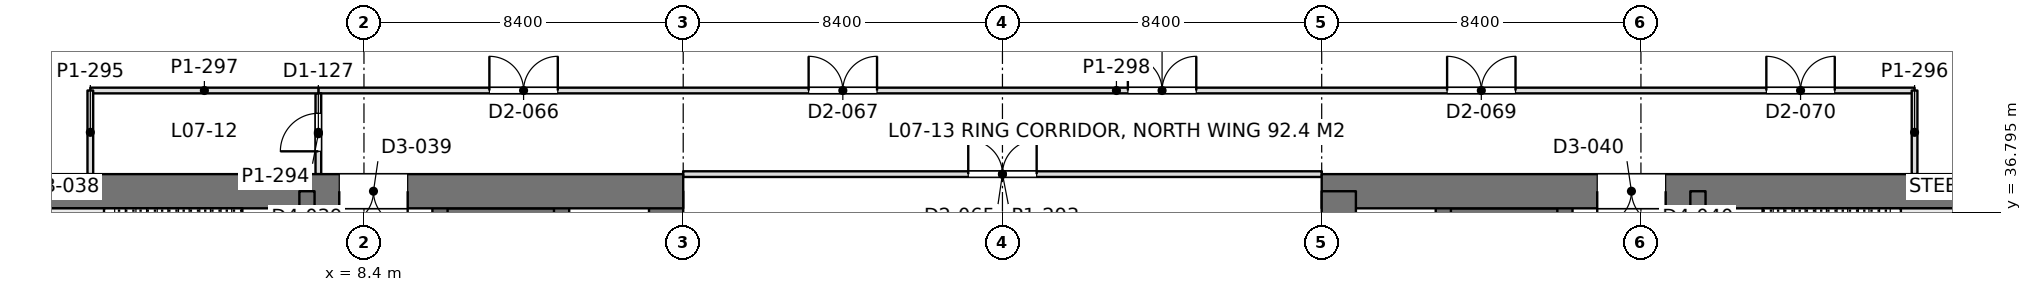
"""IFC4 building model, lengths in metres.
Left out: names, types, materials, properties, quantities, classifications, styles, units other than length and angle.
Written with IfcOpenShell. Run it as: python <this file> out.ifc"""

import sys

from ifc_helpers import new_model, si_unit, direction, frame, frame_2d, origin, place, context, subcontext, project, spatial, rectangle, extrude, element, fill, save


model = new_model("IFC4")
c1 = context("Model", 3, precision=1e-05, world=origin(), true_north=direction((0.0, 1.0)))
c2 = subcontext(c1, "Body", "Model", "MODEL_VIEW")
j1 = project(units=[si_unit("LENGTHUNIT", "METRE"), si_unit("PLANEANGLEUNIT", "RADIAN")], contexts=[c1])
p1 = place(None, origin())
s1 = spatial("IfcSite", under=j1, at=p1, CompositionType="ELEMENT")
p2 = place(p1, origin())
s2 = spatial("IfcBuilding", under=s1, at=p2, CompositionType="ELEMENT")
p3 = place(p2, frame((0.0, 0.0, 32.4)))
s3 = spatial("IfcBuildingStorey", under=s2, at=p3, CompositionType="ELEMENT", Elevation=32.4)
p4 = place(p3, frame((-1.2, 37.35, 0.0), z_axis=(0.0, 0.0, 1.0), x_axis=(1.0, 0.0, 0.0)))
e1 = element("IfcWall", 1, at=p4, inside=s3, PredefinedType="SHEAR", context=c2, shape_type="SweptSolid", body=[
    extrude(rectangle(XDim=18.0, YDim=0.9, at=frame_2d((9.0, 0.0))), origin(), (0.0, 0.0, 1.0), 4.5),
])
p5 = place(p4, frame((8.95, 0.0, 0.0)))
e2 = element("IfcOpeningElement", 2, at=p5, cuts=e1, PredefinedType="OPENING", context=c2, shape_type="SweptSolid", body=[
    extrude(rectangle(XDim=1.8, YDim=2.4, at=frame_2d((0.9, 1.2))), frame((0.0, 0.46, 0.0), z_axis=(0.0, -1.0, 0.0), x_axis=(1.0, 0.0, 0.0)), (0.0, 0.0, 1.0), 0.92),
])
p6 = place(p3, frame((16.35, 13.05, 0.0), z_axis=(0.0, 0.0, 1.0), x_axis=(0.0, 1.0, 0.0)))
e3 = element("IfcWall", 3, at=p6, inside=s3, PredefinedType="SHEAR", context=c2, shape_type="SweptSolid", body=[
    extrude(rectangle(XDim=24.3, YDim=0.9, at=frame_2d((12.15, 0.0))), origin(), (0.0, 0.0, 1.0), 4.5),
])
p7 = place(p3, frame((6.9, 13.05, 0.0), z_axis=(0.0, 0.0, 1.0), x_axis=(0.0, 1.0, 0.0)))
e4 = element("IfcWall", 4, at=p7, inside=s3, PredefinedType="SHEAR", context=c2, shape_type="SweptSolid", body=[
    extrude(rectangle(XDim=24.3, YDim=0.4, at=frame_2d((12.15, 0.0))), origin(), (0.0, 0.0, 1.0), 4.5),
])
p8 = place(p7, frame((1.3, 0.0, 0.0)))
e5 = element("IfcOpeningElement", 5, at=p8, cuts=e4, PredefinedType="OPENING", context=c2, shape_type="SweptSolid", body=[
    extrude(rectangle(XDim=1.0, YDim=2.2, at=frame_2d((0.5, 1.1))), frame((0.0, 0.21, 0.0), z_axis=(0.0, -1.0, 0.0), x_axis=(1.0, 0.0, 0.0)), (0.0, 0.0, 1.0), 0.42),
])
p9 = place(p7, frame((22.0, 0.0, 0.0)))
e6 = element("IfcOpeningElement", 6, at=p9, cuts=e4, PredefinedType="OPENING", context=c2, shape_type="SweptSolid", body=[
    extrude(rectangle(XDim=1.0, YDim=2.2, at=frame_2d((0.5, 1.1))), frame((0.0, 0.21, 0.0), z_axis=(0.0, -1.0, 0.0), x_axis=(1.0, 0.0, 0.0)), (0.0, 0.0, 1.0), 0.42),
])
p10 = place(p7, frame((5.55, 0.0, 0.0)))
e7 = element("IfcOpeningElement", 7, at=p10, cuts=e4, PredefinedType="OPENING", context=c2, shape_type="SweptSolid", body=[
    extrude(rectangle(XDim=1.0, YDim=2.2, at=frame_2d((0.5, 1.1))), frame((0.0, 0.21, 0.0), z_axis=(0.0, -1.0, 0.0), x_axis=(1.0, 0.0, 0.0)), (0.0, 0.0, 1.0), 0.42),
])
p11 = place(p7, frame((9.55, 0.0, 0.0)))
e8 = element("IfcOpeningElement", 8, at=p11, cuts=e4, PredefinedType="OPENING", context=c2, shape_type="SweptSolid", body=[
    extrude(rectangle(XDim=1.0, YDim=2.2, at=frame_2d((0.5, 1.1))), frame((0.0, 0.21, 0.0), z_axis=(0.0, -1.0, 0.0), x_axis=(1.0, 0.0, 0.0)), (0.0, 0.0, 1.0), 0.42),
])
p12 = place(p7, frame((12.8, 0.0, 0.0)))
e9 = element("IfcOpeningElement", 9, at=p12, cuts=e4, PredefinedType="OPENING", context=c2, shape_type="SweptSolid", body=[
    extrude(rectangle(XDim=1.1, YDim=2.2, at=frame_2d((0.55, 1.1))), frame((0.0, 0.21, 0.0), z_axis=(0.0, -1.0, 0.0), x_axis=(1.0, 0.0, 0.0)), (0.0, 0.0, 1.0), 0.42),
])
p13 = place(p7, frame((15.538, 0.0, 0.0)))
e10 = element("IfcOpeningElement", 10, at=p13, cuts=e4, PredefinedType="OPENING", context=c2, shape_type="SweptSolid", body=[
    extrude(rectangle(XDim=1.1, YDim=2.2, at=frame_2d((0.55, 1.1))), frame((0.0, 0.21, 0.0), z_axis=(0.0, -1.0, 0.0), x_axis=(1.0, 0.0, 0.0)), (0.0, 0.0, 1.0), 0.42),
])
p14 = place(p7, frame((18.262, 0.0, 0.0)))
e11 = element("IfcOpeningElement", 11, at=p14, cuts=e4, PredefinedType="OPENING", context=c2, shape_type="SweptSolid", body=[
    extrude(rectangle(XDim=1.1, YDim=2.2, at=frame_2d((0.55, 1.1))), frame((0.0, 0.21, 0.0), z_axis=(0.0, -1.0, 0.0), x_axis=(1.0, 0.0, 0.0)), (0.0, 0.0, 1.0), 0.42),
])
p15 = place(p3, frame((10.4, 13.05, 0.0), z_axis=(0.0, 0.0, 1.0), x_axis=(0.0, 1.0, 0.0)))
e12 = element("IfcWall", 12, at=p15, inside=s3, PredefinedType="SHEAR", context=c2, shape_type="SweptSolid", body=[
    extrude(rectangle(XDim=24.3, YDim=0.4, at=frame_2d((12.15, 0.0))), origin(), (0.0, 0.0, 1.0), 4.5),
])
p16 = place(p15, frame((1.5, 0.0, 0.0)))
e13 = element("IfcOpeningElement", 13, at=p16, cuts=e12, PredefinedType="OPENING", context=c2, shape_type="SweptSolid", body=[
    extrude(rectangle(XDim=1.1, YDim=2.2, at=frame_2d((0.55, 1.1))), frame((0.0, 0.21, 0.0), z_axis=(0.0, -1.0, 0.0), x_axis=(1.0, 0.0, 0.0)), (0.0, 0.0, 1.0), 0.42),
])
p17 = place(p15, frame((4.35, 0.0, 0.0)))
e14 = element("IfcOpeningElement", 14, at=p17, cuts=e12, PredefinedType="OPENING", context=c2, shape_type="SweptSolid", body=[
    extrude(rectangle(XDim=1.1, YDim=2.2, at=frame_2d((0.55, 1.1))), frame((0.0, 0.21, 0.0), z_axis=(0.0, -1.0, 0.0), x_axis=(1.0, 0.0, 0.0)), (0.0, 0.0, 1.0), 0.42),
])
p18 = place(p15, frame((7.2, 0.0, 0.0)))
e15 = element("IfcOpeningElement", 15, at=p18, cuts=e12, PredefinedType="OPENING", context=c2, shape_type="SweptSolid", body=[
    extrude(rectangle(XDim=1.1, YDim=2.2, at=frame_2d((0.55, 1.1))), frame((0.0, 0.21, 0.0), z_axis=(0.0, -1.0, 0.0), x_axis=(1.0, 0.0, 0.0)), (0.0, 0.0, 1.0), 0.42),
])
p19 = place(p15, frame((21.45, 0.0, 0.0)))
e16 = element("IfcOpeningElement", 16, at=p19, cuts=e12, PredefinedType="OPENING", context=c2, shape_type="SweptSolid", body=[
    extrude(rectangle(XDim=1.1, YDim=2.2, at=frame_2d((0.55, 1.1))), frame((0.0, 0.21, 0.0), z_axis=(0.0, -1.0, 0.0), x_axis=(1.0, 0.0, 0.0)), (0.0, 0.0, 1.0), 0.42),
])
p20 = place(p3, frame((13.6, 13.05, 0.0), z_axis=(0.0, 0.0, 1.0), x_axis=(0.0, 1.0, 0.0)))
e17 = element("IfcWall", 17, at=p20, inside=s3, PredefinedType="SHEAR", context=c2, shape_type="SweptSolid", body=[
    extrude(rectangle(XDim=24.3, YDim=0.4, at=frame_2d((12.15, 0.0))), origin(), (0.0, 0.0, 1.0), 4.5),
])
p21 = place(p3, frame((10.4, 36.625, 0.0), z_axis=(0.0, 0.0, 1.0), x_axis=(1.0, 0.0, 0.0)))
e18 = element("IfcWall", 18, at=p21, inside=s3, PredefinedType="SHEAR", context=c2, shape_type="SweptSolid", body=[
    extrude(rectangle(XDim=3.2, YDim=0.55, at=frame_2d((1.6, 0.0))), origin(), (0.0, 0.0, 1.0), 4.5),
])
p22 = place(p3, frame((33.6, 37.35, 0.0), z_axis=(0.0, 0.0, 1.0), x_axis=(1.0, 0.0, 0.0)))
e19 = element("IfcWall", 19, at=p22, inside=s3, PredefinedType="SHEAR", context=c2, shape_type="SweptSolid", body=[
    extrude(rectangle(XDim=18.0, YDim=0.9, at=frame_2d((9.0, 0.0))), origin(), (0.0, 0.0, 1.0), 4.5),
])
p23 = place(p22, frame((7.25, 0.0, 0.0)))
e20 = element("IfcOpeningElement", 20, at=p23, cuts=e19, PredefinedType="OPENING", context=c2, shape_type="SweptSolid", body=[
    extrude(rectangle(XDim=1.8, YDim=2.4, at=frame_2d((0.9, 1.2))), frame((0.0, 0.46, 0.0), z_axis=(0.0, -1.0, 0.0), x_axis=(1.0, 0.0, 0.0)), (0.0, 0.0, 1.0), 0.92),
])
p24 = place(p3, frame((34.05, 13.05, 0.0), z_axis=(0.0, 0.0, 1.0), x_axis=(0.0, 1.0, 0.0)))
e21 = element("IfcWall", 21, at=p24, inside=s3, PredefinedType="SHEAR", context=c2, shape_type="SweptSolid", body=[
    extrude(rectangle(XDim=24.3, YDim=0.9, at=frame_2d((12.15, 0.0))), origin(), (0.0, 0.0, 1.0), 4.5),
])
p25 = place(p3, frame((43.5, 13.05, 0.0), z_axis=(0.0, 0.0, 1.0), x_axis=(0.0, 1.0, 0.0)))
e22 = element("IfcWall", 22, at=p25, inside=s3, PredefinedType="SHEAR", context=c2, shape_type="SweptSolid", body=[
    extrude(rectangle(XDim=24.3, YDim=0.4, at=frame_2d((12.15, 0.0))), origin(), (0.0, 0.0, 1.0), 4.5),
])
p26 = place(p25, frame((1.3, 0.0, 0.0)))
e23 = element("IfcOpeningElement", 23, at=p26, cuts=e22, PredefinedType="OPENING", context=c2, shape_type="SweptSolid", body=[
    extrude(rectangle(XDim=1.0, YDim=2.2, at=frame_2d((0.5, 1.1))), frame((0.0, 0.21, 0.0), z_axis=(0.0, -1.0, 0.0), x_axis=(1.0, 0.0, 0.0)), (0.0, 0.0, 1.0), 0.42),
])
p27 = place(p25, frame((22.0, 0.0, 0.0)))
e24 = element("IfcOpeningElement", 24, at=p27, cuts=e22, PredefinedType="OPENING", context=c2, shape_type="SweptSolid", body=[
    extrude(rectangle(XDim=1.0, YDim=2.2, at=frame_2d((0.5, 1.1))), frame((0.0, 0.21, 0.0), z_axis=(0.0, -1.0, 0.0), x_axis=(1.0, 0.0, 0.0)), (0.0, 0.0, 1.0), 0.42),
])
p28 = place(p25, frame((5.55, 0.0, 0.0)))
e25 = element("IfcOpeningElement", 25, at=p28, cuts=e22, PredefinedType="OPENING", context=c2, shape_type="SweptSolid", body=[
    extrude(rectangle(XDim=1.0, YDim=2.2, at=frame_2d((0.5, 1.1))), frame((0.0, 0.21, 0.0), z_axis=(0.0, -1.0, 0.0), x_axis=(1.0, 0.0, 0.0)), (0.0, 0.0, 1.0), 0.42),
])
p29 = place(p25, frame((9.55, 0.0, 0.0)))
e26 = element("IfcOpeningElement", 26, at=p29, cuts=e22, PredefinedType="OPENING", context=c2, shape_type="SweptSolid", body=[
    extrude(rectangle(XDim=1.0, YDim=2.2, at=frame_2d((0.5, 1.1))), frame((0.0, 0.21, 0.0), z_axis=(0.0, -1.0, 0.0), x_axis=(1.0, 0.0, 0.0)), (0.0, 0.0, 1.0), 0.42),
])
p30 = place(p25, frame((12.8, 0.0, 0.0)))
e27 = element("IfcOpeningElement", 27, at=p30, cuts=e22, PredefinedType="OPENING", context=c2, shape_type="SweptSolid", body=[
    extrude(rectangle(XDim=1.1, YDim=2.2, at=frame_2d((0.55, 1.1))), frame((0.0, 0.21, 0.0), z_axis=(0.0, -1.0, 0.0), x_axis=(1.0, 0.0, 0.0)), (0.0, 0.0, 1.0), 0.42),
])
p31 = place(p25, frame((15.538, 0.0, 0.0)))
e28 = element("IfcOpeningElement", 28, at=p31, cuts=e22, PredefinedType="OPENING", context=c2, shape_type="SweptSolid", body=[
    extrude(rectangle(XDim=1.1, YDim=2.2, at=frame_2d((0.55, 1.1))), frame((0.0, 0.21, 0.0), z_axis=(0.0, -1.0, 0.0), x_axis=(1.0, 0.0, 0.0)), (0.0, 0.0, 1.0), 0.42),
])
p32 = place(p25, frame((18.262, 0.0, 0.0)))
e29 = element("IfcOpeningElement", 29, at=p32, cuts=e22, PredefinedType="OPENING", context=c2, shape_type="SweptSolid", body=[
    extrude(rectangle(XDim=1.1, YDim=2.2, at=frame_2d((0.55, 1.1))), frame((0.0, 0.21, 0.0), z_axis=(0.0, -1.0, 0.0), x_axis=(1.0, 0.0, 0.0)), (0.0, 0.0, 1.0), 0.42),
])
p33 = place(p3, frame((40.0, 13.05, 0.0), z_axis=(0.0, 0.0, 1.0), x_axis=(0.0, 1.0, 0.0)))
e30 = element("IfcWall", 30, at=p33, inside=s3, PredefinedType="SHEAR", context=c2, shape_type="SweptSolid", body=[
    extrude(rectangle(XDim=24.3, YDim=0.4, at=frame_2d((12.15, 0.0))), origin(), (0.0, 0.0, 1.0), 4.5),
])
p34 = place(p33, frame((1.5, 0.0, 0.0)))
e31 = element("IfcOpeningElement", 31, at=p34, cuts=e30, PredefinedType="OPENING", context=c2, shape_type="SweptSolid", body=[
    extrude(rectangle(XDim=1.1, YDim=2.2, at=frame_2d((0.55, 1.1))), frame((0.0, 0.21, 0.0), z_axis=(0.0, -1.0, 0.0), x_axis=(1.0, 0.0, 0.0)), (0.0, 0.0, 1.0), 0.42),
])
p35 = place(p33, frame((4.35, 0.0, 0.0)))
e32 = element("IfcOpeningElement", 32, at=p35, cuts=e30, PredefinedType="OPENING", context=c2, shape_type="SweptSolid", body=[
    extrude(rectangle(XDim=1.1, YDim=2.2, at=frame_2d((0.55, 1.1))), frame((0.0, 0.21, 0.0), z_axis=(0.0, -1.0, 0.0), x_axis=(1.0, 0.0, 0.0)), (0.0, 0.0, 1.0), 0.42),
])
p36 = place(p33, frame((7.2, 0.0, 0.0)))
e33 = element("IfcOpeningElement", 33, at=p36, cuts=e30, PredefinedType="OPENING", context=c2, shape_type="SweptSolid", body=[
    extrude(rectangle(XDim=1.1, YDim=2.2, at=frame_2d((0.55, 1.1))), frame((0.0, 0.21, 0.0), z_axis=(0.0, -1.0, 0.0), x_axis=(1.0, 0.0, 0.0)), (0.0, 0.0, 1.0), 0.42),
])
p37 = place(p33, frame((21.45, 0.0, 0.0)))
e34 = element("IfcOpeningElement", 34, at=p37, cuts=e30, PredefinedType="OPENING", context=c2, shape_type="SweptSolid", body=[
    extrude(rectangle(XDim=1.1, YDim=2.2, at=frame_2d((0.55, 1.1))), frame((0.0, 0.21, 0.0), z_axis=(0.0, -1.0, 0.0), x_axis=(1.0, 0.0, 0.0)), (0.0, 0.0, 1.0), 0.42),
])
p38 = place(p3, frame((36.8, 13.05, 0.0), z_axis=(0.0, 0.0, 1.0), x_axis=(0.0, 1.0, 0.0)))
e35 = element("IfcWall", 35, at=p38, inside=s3, PredefinedType="SHEAR", context=c2, shape_type="SweptSolid", body=[
    extrude(rectangle(XDim=24.3, YDim=0.4, at=frame_2d((12.15, 0.0))), origin(), (0.0, 0.0, 1.0), 4.5),
])
p39 = place(p3, frame((40.0, 36.625, 0.0), z_axis=(0.0, 0.0, 1.0), x_axis=(-1.0, 0.0, 0.0)))
e36 = element("IfcWall", 36, at=p39, inside=s3, PredefinedType="SHEAR", context=c2, shape_type="SweptSolid", body=[
    extrude(rectangle(XDim=3.2, YDim=0.55, at=frame_2d((1.6, 0.0))), origin(), (0.0, 0.0, 1.0), 4.5),
])
p40 = place(p3, frame((7.198, 40.0, 0.0), z_axis=(0.0, 0.0, 1.0), x_axis=(1.0, 0.0, 0.0)))
e37 = element("IfcWall", 37, at=p40, inside=s3, PredefinedType="PARTITIONING", context=c2, shape_type="SweptSolid", body=[
    extrude(rectangle(XDim=42.002, YDim=0.15, at=frame_2d((21.001, 0.0))), origin(), (0.0, 0.0, 1.0), 3.74),
])
p41 = place(p40, frame((4.502, 0.0, 0.0)))
e38 = element("IfcOpeningElement", 38, at=p41, cuts=e37, PredefinedType="OPENING", context=c2, shape_type="SweptSolid", body=[
    extrude(rectangle(XDim=1.8, YDim=2.2, at=frame_2d((0.9, 1.1))), frame((0.0, 0.085, 0.0), z_axis=(0.0, -1.0, 0.0), x_axis=(1.0, 0.0, 0.0)), (0.0, 0.0, 1.0), 0.17),
])
p42 = place(p40, frame((12.902, 0.0, 0.0)))
e39 = element("IfcOpeningElement", 39, at=p42, cuts=e37, PredefinedType="OPENING", context=c2, shape_type="SweptSolid", body=[
    extrude(rectangle(XDim=1.8, YDim=2.2, at=frame_2d((0.9, 1.1))), frame((0.0, 0.085, 0.0), z_axis=(0.0, -1.0, 0.0), x_axis=(1.0, 0.0, 0.0)), (0.0, 0.0, 1.0), 0.17),
])
p43 = place(p40, frame((21.302, 0.0, 0.0)))
e40 = element("IfcOpeningElement", 40, at=p43, cuts=e37, PredefinedType="OPENING", context=c2, shape_type="SweptSolid", body=[
    extrude(rectangle(XDim=1.8, YDim=2.2, at=frame_2d((0.9, 1.1))), frame((0.0, 0.085, 0.0), z_axis=(0.0, -1.0, 0.0), x_axis=(1.0, 0.0, 0.0)), (0.0, 0.0, 1.0), 0.17),
])
p44 = place(p40, frame((29.702, 0.0, 0.0)))
e41 = element("IfcOpeningElement", 41, at=p44, cuts=e37, PredefinedType="OPENING", context=c2, shape_type="SweptSolid", body=[
    extrude(rectangle(XDim=1.8, YDim=2.2, at=frame_2d((0.9, 1.1))), frame((0.0, 0.085, 0.0), z_axis=(0.0, -1.0, 0.0), x_axis=(1.0, 0.0, 0.0)), (0.0, 0.0, 1.0), 0.17),
])
p45 = place(p40, frame((38.102, 0.0, 0.0)))
e42 = element("IfcOpeningElement", 42, at=p45, cuts=e37, PredefinedType="OPENING", context=c2, shape_type="SweptSolid", body=[
    extrude(rectangle(XDim=1.8, YDim=2.2, at=frame_2d((0.9, 1.1))), frame((0.0, 0.085, 0.0), z_axis=(0.0, -1.0, 0.0), x_axis=(1.0, 0.0, 0.0)), (0.0, 0.0, 1.0), 0.17),
])
p46 = place(p3, frame((7.2, 37.8, 0.0), z_axis=(0.0, 0.0, 1.0), x_axis=(0.0, 1.0, 0.0)))
e43 = element("IfcWall", 43, at=p46, inside=s3, PredefinedType="PARTITIONING", context=c2, shape_type="SweptSolid", body=[
    extrude(rectangle(XDim=2.126, YDim=0.15, at=frame_2d((1.063, 0.0))), origin(), (0.0, 0.0, 1.0), 4.34),
])
p47 = place(p46, frame((0.6, 0.0, 0.0)))
e44 = element("IfcOpeningElement", 44, at=p47, cuts=e43, PredefinedType="OPENING", context=c2, shape_type="SweptSolid", body=[
    extrude(rectangle(XDim=1.0, YDim=2.2, at=frame_2d((0.5, 1.1))), frame((0.0, 0.085, 0.0), z_axis=(0.0, -1.0, 0.0), x_axis=(1.0, 0.0, 0.0)), (0.0, 0.0, 1.0), 0.17),
])
p48 = place(p3, frame((49.2, 37.8, 0.0), z_axis=(0.0, 0.0, 1.0), x_axis=(0.0, 1.0, 0.0)))
e45 = element("IfcWall", 45, at=p48, inside=s3, PredefinedType="PARTITIONING", context=c2, shape_type="SweptSolid", body=[
    extrude(rectangle(XDim=2.2, YDim=0.15, at=frame_2d((1.1, 0.0))), origin(), (0.0, 0.0, 1.0), 4.34),
])
p49 = place(p3, frame((1.2, 40.0, 0.0), z_axis=(0.0, 0.0, 1.0), x_axis=(1.0, 0.0, 0.0)))
e46 = element("IfcWall", 46, at=p49, inside=s3, PredefinedType="PARTITIONING", context=c2, shape_type="SweptSolid", body=[
    extrude(rectangle(XDim=6.002, YDim=0.15, at=frame_2d((3.001, 0.0))), origin(), (0.0, 0.0, 1.0), 3.98),
])
p50 = place(p3, frame((1.2, 37.8, 0.0), z_axis=(0.0, 0.0, 1.0), x_axis=(0.0, 1.0, 0.0)))
e47 = element("IfcWall", 47, at=p50, inside=s3, PredefinedType="PARTITIONING", context=c2, shape_type="SweptSolid", body=[
    extrude(rectangle(XDim=2.2, YDim=0.15, at=frame_2d((1.1, 0.0))), origin(), (0.0, 0.0, 1.0), 4.34),
])
p51 = place(p3, frame((16.798, 37.8, 0.0), z_axis=(0.0, 0.0, 1.0), x_axis=(1.0, 0.0, 0.0)))
e48 = element("IfcWall", 48, at=p51, inside=s3, PredefinedType="PARTITIONING", context=c2, shape_type="SweptSolid", body=[
    extrude(rectangle(XDim=16.804, YDim=0.15, at=frame_2d((8.402, 0.0))), origin(), (0.0, 0.0, 1.0), 3.74),
])
p52 = place(p51, frame((7.502, 0.0, 0.0)))
e49 = element("IfcOpeningElement", 49, at=p52, cuts=e48, PredefinedType="OPENING", context=c2, shape_type="SweptSolid", body=[
    extrude(rectangle(XDim=1.8, YDim=2.2, at=frame_2d((0.9, 1.1))), frame((0.0, 0.085, 0.0), z_axis=(0.0, -1.0, 0.0), x_axis=(1.0, 0.0, 0.0)), (0.0, 0.0, 1.0), 0.17),
])
p53 = place(p5, frame((1.8, 0.0, 0.0), z_axis=(0.0, 0.0, 1.0), x_axis=(-1.0, 0.0, 0.0)))
e50 = element("IfcDoor", 50, at=p53, inside=s3, OperationType="DOUBLE_DOOR_SINGLE_SWING", PredefinedType="DOOR", context=c2, shape_type="SweptSolid", body=[
    extrude(rectangle(XDim=1.8, YDim=2.4, at=frame_2d((0.9, 1.2))), frame((0.0, 0.025, 0.0), z_axis=(0.0, -1.0, 0.0), x_axis=(1.0, 0.0, 0.0)), (0.0, 0.0, 1.0), 0.05),
])
fill(e2, e50)
p54 = place(p23, frame((1.8, 0.0, 0.0), z_axis=(0.0, 0.0, 1.0), x_axis=(-1.0, 0.0, 0.0)))
e51 = element("IfcDoor", 51, at=p54, inside=s3, OperationType="DOUBLE_DOOR_SINGLE_SWING", PredefinedType="DOOR", context=c2, shape_type="SweptSolid", body=[
    extrude(rectangle(XDim=1.8, YDim=2.4, at=frame_2d((0.9, 1.2))), frame((0.0, 0.025, 0.0), z_axis=(0.0, -1.0, 0.0), x_axis=(1.0, 0.0, 0.0)), (0.0, 0.0, 1.0), 0.05),
])
fill(e20, e51)
p55 = place(p41, origin())
e52 = element("IfcDoor", 52, at=p55, inside=s3, OperationType="DOUBLE_DOOR_SINGLE_SWING", PredefinedType="DOOR", context=c2, shape_type="SweptSolid", body=[
    extrude(rectangle(XDim=1.8, YDim=2.2, at=frame_2d((0.9, 1.1))), frame((0.0, 0.025, 0.0), z_axis=(0.0, -1.0, 0.0), x_axis=(1.0, 0.0, 0.0)), (0.0, 0.0, 1.0), 0.05),
])
fill(e38, e52)
p56 = place(p42, origin())
e53 = element("IfcDoor", 53, at=p56, inside=s3, OperationType="DOUBLE_DOOR_SINGLE_SWING", PredefinedType="DOOR", context=c2, shape_type="SweptSolid", body=[
    extrude(rectangle(XDim=1.8, YDim=2.2, at=frame_2d((0.9, 1.1))), frame((0.0, 0.025, 0.0), z_axis=(0.0, -1.0, 0.0), x_axis=(1.0, 0.0, 0.0)), (0.0, 0.0, 1.0), 0.05),
])
fill(e39, e53)
p57 = place(p43, origin())
e54 = element("IfcDoor", 54, at=p57, inside=s3, OperationType="DOUBLE_DOOR_SINGLE_SWING", PredefinedType="DOOR", context=c2, shape_type="SweptSolid", body=[
    extrude(rectangle(XDim=1.8, YDim=2.2, at=frame_2d((0.9, 1.1))), frame((0.0, 0.025, 0.0), z_axis=(0.0, -1.0, 0.0), x_axis=(1.0, 0.0, 0.0)), (0.0, 0.0, 1.0), 0.05),
])
fill(e40, e54)
p58 = place(p44, origin())
e55 = element("IfcDoor", 55, at=p58, inside=s3, OperationType="DOUBLE_DOOR_SINGLE_SWING", PredefinedType="DOOR", context=c2, shape_type="SweptSolid", body=[
    extrude(rectangle(XDim=1.8, YDim=2.2, at=frame_2d((0.9, 1.1))), frame((0.0, 0.025, 0.0), z_axis=(0.0, -1.0, 0.0), x_axis=(1.0, 0.0, 0.0)), (0.0, 0.0, 1.0), 0.05),
])
fill(e41, e55)
p59 = place(p45, origin())
e56 = element("IfcDoor", 56, at=p59, inside=s3, OperationType="DOUBLE_DOOR_SINGLE_SWING", PredefinedType="DOOR", context=c2, shape_type="SweptSolid", body=[
    extrude(rectangle(XDim=1.8, YDim=2.2, at=frame_2d((0.9, 1.1))), frame((0.0, 0.025, 0.0), z_axis=(0.0, -1.0, 0.0), x_axis=(1.0, 0.0, 0.0)), (0.0, 0.0, 1.0), 0.05),
])
fill(e42, e56)
p60 = place(p47, origin())
e57 = element("IfcDoor", 57, at=p60, inside=s3, OperationType="SINGLE_SWING_LEFT", PredefinedType="DOOR", context=c2, shape_type="SweptSolid", body=[
    extrude(rectangle(XDim=1.0, YDim=2.2, at=frame_2d((0.5, 1.1))), frame((0.0, 0.025, 0.0), z_axis=(0.0, -1.0, 0.0), x_axis=(1.0, 0.0, 0.0)), (0.0, 0.0, 1.0), 0.05),
])
fill(e44, e57)
p61 = place(p52, origin())
e58 = element("IfcDoor", 58, at=p61, inside=s3, OperationType="DOUBLE_DOOR_SINGLE_SWING", PredefinedType="DOOR", context=c2, shape_type="SweptSolid", body=[
    extrude(rectangle(XDim=1.8, YDim=2.2, at=frame_2d((0.9, 1.1))), frame((0.0, 0.025, 0.0), z_axis=(0.0, -1.0, 0.0), x_axis=(1.0, 0.0, 0.0)), (0.0, 0.0, 1.0), 0.05),
])
fill(e49, e58)
save(model, sys.argv[1])
